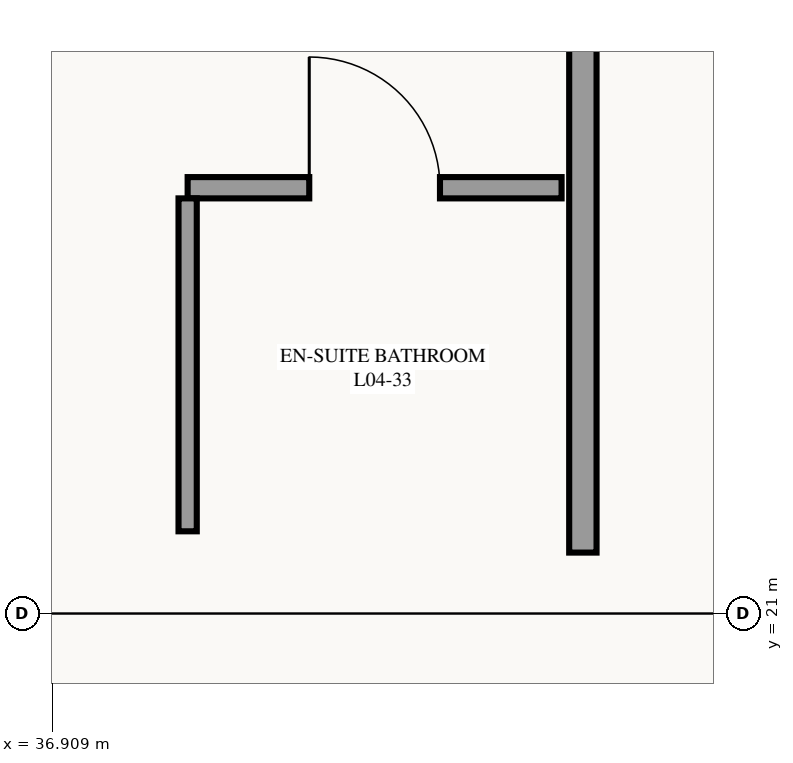
"""IFC4 building model, lengths in metres.
Left out: names, types, materials, properties, quantities, classifications, styles, units other than length and angle.
Written with IfcOpenShell. Run it as: python <this file> out.ifc"""

import sys

from ifc_helpers import new_model, si_unit, direction, frame, frame_2d, origin, place, context, subcontext, project, spatial, rectangle, extrude, element, fill, save


model = new_model("IFC4")
c1 = context("Model", 3, precision=1e-05, world=origin(), true_north=direction((0.0, 1.0)))
c2 = subcontext(c1, "Body", "Model", "MODEL_VIEW")
j1 = project(units=[si_unit("LENGTHUNIT", "METRE"), si_unit("PLANEANGLEUNIT", "RADIAN")], contexts=[c1])
p1 = place(None, origin())
s1 = spatial("IfcSite", under=j1, at=p1, CompositionType="ELEMENT")
p2 = place(p1, origin())
s2 = spatial("IfcBuilding", under=s1, at=p2, CompositionType="ELEMENT")
p3 = place(p2, frame((0.0, 0.0, 18.3)))
s3 = spatial("IfcBuildingStorey", under=s2, at=p3, CompositionType="ELEMENT", Elevation=18.3)
p4 = place(p3, frame((40.4, 21.4, 0.0), z_axis=(0.0, 0.0, 1.0), x_axis=(0.0, 1.0, 0.0)))
e1 = element("IfcWall", 1, at=p4, inside=s3, PredefinedType="PARTITIONING", context=c2, shape_type="SweptSolid", body=[
    extrude(rectangle(XDim=6.289, YDim=0.18, at=frame_2d((3.145, 0.0))), origin(), (0.0, 0.0, 1.0), 3.375),
])
p5 = place(p4, frame((3.849, 0.0, 0.0)))
e2 = element("IfcOpeningElement", 2, at=p5, cuts=e1, PredefinedType="OPENING", context=c2, shape_type="SweptSolid", body=[
    extrude(rectangle(XDim=0.96, YDim=2.15, at=frame_2d((0.48, 1.075))), frame((0.0, 0.1, 0.0), z_axis=(0.0, -1.0, 0.0), x_axis=(1.0, 0.0, 0.0)), (0.0, 0.0, 1.0), 0.2),
])
p6 = place(p3, frame((37.8, 23.8, 0.0), z_axis=(0.0, 0.0, 1.0), x_axis=(1.0, 0.0, 0.0)))
e3 = element("IfcWall", 3, at=p6, inside=s3, PredefinedType="PARTITIONING", context=c2, shape_type="SweptSolid", body=[
    extrude(rectangle(XDim=2.46, YDim=0.14, at=frame_2d((1.23, 0.0))), origin(), (0.0, 0.0, 1.0), 3.375),
])
p7 = place(p6, frame((0.8, 0.0, 0.0)))
e4 = element("IfcOpeningElement", 4, at=p7, cuts=e3, PredefinedType="OPENING", context=c2, shape_type="SweptSolid", body=[
    extrude(rectangle(XDim=0.86, YDim=2.1, at=frame_2d((0.43, 1.05))), frame((0.0, 0.08, 0.0), z_axis=(0.0, -1.0, 0.0), x_axis=(1.0, 0.0, 0.0)), (0.0, 0.0, 1.0), 0.16),
])
p8 = place(p3, frame((37.8, 21.54, 0.0), z_axis=(0.0, 0.0, 1.0), x_axis=(0.0, 1.0, 0.0)))
e5 = element("IfcWall", 5, at=p8, inside=s3, PredefinedType="PARTITIONING", context=c2, shape_type="SweptSolid", body=[
    extrude(rectangle(XDim=2.19, YDim=0.12, at=frame_2d((1.095, 0.0))), origin(), (0.0, 0.0, 1.0), 3.375),
])
p9 = place(p7, origin())
e6 = element("IfcDoor", 6, at=p9, inside=s3, OperationType="SINGLE_SWING_LEFT", PredefinedType="DOOR", context=c2, shape_type="SweptSolid", body=[
    extrude(rectangle(XDim=0.86, YDim=2.1, at=frame_2d((0.43, 1.05))), frame((0.0, 0.025, 0.0), z_axis=(0.0, -1.0, 0.0), x_axis=(1.0, 0.0, 0.0)), (0.0, 0.0, 1.0), 0.05),
])
fill(e4, e6)
save(model, sys.argv[1])
